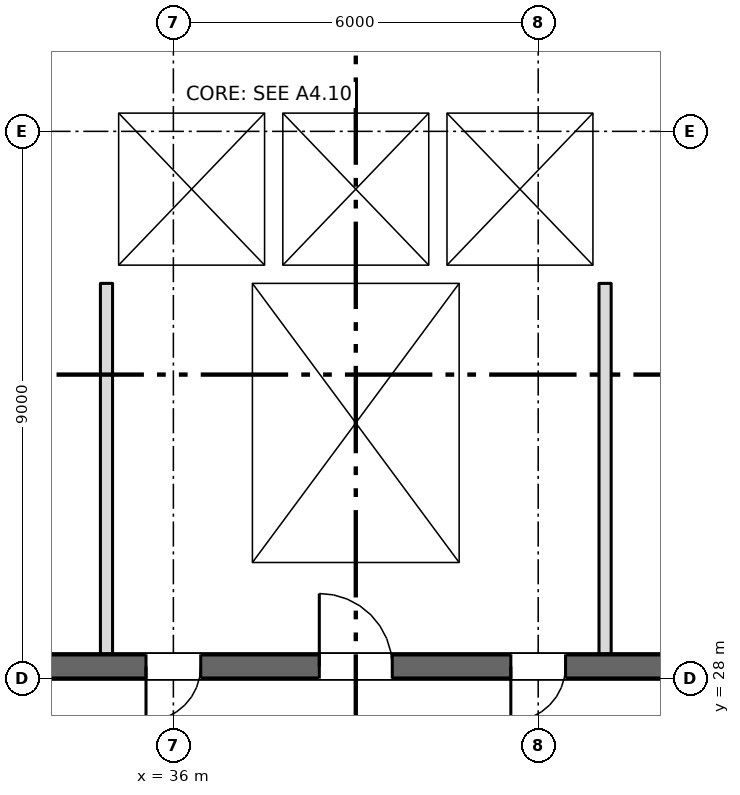
"""IFC4 building model, lengths in metres.
Left out: names, types, materials, properties, quantities, classifications, styles, units other than length and angle.
Written with IfcOpenShell. Run it as: python <this file> out.ifc"""

import sys

from ifc_helpers import new_model, si_unit, direction, frame, frame_2d, origin, place, context, subcontext, project, spatial, rectangle, extrude, element, fill, save


model = new_model("IFC4")
c1 = context("Model", 3, precision=1e-05, world=origin(), true_north=direction((0.0, 1.0)))
c2 = subcontext(c1, "Body", "Model", "MODEL_VIEW")
j1 = project(units=[si_unit("LENGTHUNIT", "METRE"), si_unit("PLANEANGLEUNIT", "RADIAN")], contexts=[c1])
p1 = place(None, origin())
s1 = spatial("IfcSite", under=j1, at=p1, CompositionType="ELEMENT")
p2 = place(p1, origin())
s2 = spatial("IfcBuilding", under=s1, at=p2, CompositionType="ELEMENT")
p3 = place(p2, frame((0.0, 0.0, 60.0)))
s3 = spatial("IfcBuildingStorey", under=s2, at=p3, CompositionType="ELEMENT", Elevation=60.0)
p4 = place(p3, frame((6.7, 28.2, 0.0), z_axis=(0.0, 0.0, 1.0), x_axis=(1.0, 0.0, 0.0)))
e1 = element("IfcWall", 1, at=p4, inside=s3, PredefinedType="SHEAR", context=c2, shape_type="SweptSolid", body=[
    extrude(rectangle(XDim=57.8, YDim=0.4, at=frame_2d((28.9, 0.0))), origin(), (0.0, 0.0, 1.0), 3.35),
])
p5 = place(p4, frame((13.85, 0.0, 0.0)))
e2 = element("IfcOpeningElement", 2, at=p5, cuts=e1, PredefinedType="OPENING", context=c2, shape_type="SweptSolid", body=[
    extrude(rectangle(XDim=0.9, YDim=2.1, at=frame_2d((0.45, 1.05))), frame((0.0, 0.21, 0.0), z_axis=(0.0, -1.0, 0.0), x_axis=(1.0, 0.0, 0.0)), (0.0, 0.0, 1.0), 0.42),
])
p6 = place(p4, frame((48.562, 0.0, 0.0)))
e3 = element("IfcOpeningElement", 3, at=p6, cuts=e1, PredefinedType="OPENING", context=c2, shape_type="SweptSolid", body=[
    extrude(rectangle(XDim=0.9, YDim=2.1, at=frame_2d((0.45, 1.05))), frame((0.0, 0.21, 0.0), z_axis=(0.0, -1.0, 0.0), x_axis=(1.0, 0.0, 0.0)), (0.0, 0.0, 1.0), 0.42),
])
p7 = place(p4, frame((51.137, 0.0, 0.0)))
e4 = element("IfcOpeningElement", 4, at=p7, cuts=e1, PredefinedType="OPENING", context=c2, shape_type="SweptSolid", body=[
    extrude(rectangle(XDim=0.9, YDim=2.1, at=frame_2d((0.45, 1.05))), frame((0.0, 0.21, 0.0), z_axis=(0.0, -1.0, 0.0), x_axis=(1.0, 0.0, 0.0)), (0.0, 0.0, 1.0), 0.42),
])
p8 = place(p4, frame((1.35, 0.0, 0.0)))
e5 = element("IfcOpeningElement", 5, at=p8, cuts=e1, PredefinedType="OPENING", context=c2, shape_type="SweptSolid", body=[
    extrude(rectangle(XDim=0.9, YDim=2.1, at=frame_2d((0.45, 1.05))), frame((0.0, 0.21, 0.0), z_axis=(0.0, -1.0, 0.0), x_axis=(1.0, 0.0, 0.0)), (0.0, 0.0, 1.0), 0.42),
])
p9 = place(p4, frame((4.7, 0.0, 0.0)))
e6 = element("IfcOpeningElement", 6, at=p9, cuts=e1, PredefinedType="OPENING", context=c2, shape_type="SweptSolid", body=[
    extrude(rectangle(XDim=1.2, YDim=2.1, at=frame_2d((0.6, 1.05))), frame((0.0, 0.21, 0.0), z_axis=(0.0, -1.0, 0.0), x_axis=(1.0, 0.0, 0.0)), (0.0, 0.0, 1.0), 0.42),
])
p10 = place(p4, frame((31.7, 0.0, 0.0)))
e7 = element("IfcOpeningElement", 7, at=p10, cuts=e1, PredefinedType="OPENING", context=c2, shape_type="SweptSolid", body=[
    extrude(rectangle(XDim=1.2, YDim=2.1, at=frame_2d((0.6, 1.05))), frame((0.0, 0.21, 0.0), z_axis=(0.0, -1.0, 0.0), x_axis=(1.0, 0.0, 0.0)), (0.0, 0.0, 1.0), 0.42),
])
p11 = place(p4, frame((55.2, 0.0, 0.0)))
e8 = element("IfcOpeningElement", 8, at=p11, cuts=e1, PredefinedType="OPENING", context=c2, shape_type="SweptSolid", body=[
    extrude(rectangle(XDim=1.2, YDim=2.1, at=frame_2d((0.6, 1.05))), frame((0.0, 0.21, 0.0), z_axis=(0.0, -1.0, 0.0), x_axis=(1.0, 0.0, 0.0)), (0.0, 0.0, 1.0), 0.42),
])
p12 = place(p4, frame((21.7, 0.0, 0.0)))
e9 = element("IfcOpeningElement", 9, at=p12, cuts=e1, PredefinedType="OPENING", context=c2, shape_type="SweptSolid", body=[
    extrude(rectangle(XDim=1.2, YDim=2.1, at=frame_2d((0.6, 1.05))), frame((0.0, 0.21, 0.0), z_axis=(0.0, -1.0, 0.0), x_axis=(1.0, 0.0, 0.0)), (0.0, 0.0, 1.0), 0.42),
])
p13 = place(p4, frame((41.7, 0.0, 0.0)))
e10 = element("IfcOpeningElement", 10, at=p13, cuts=e1, PredefinedType="OPENING", context=c2, shape_type="SweptSolid", body=[
    extrude(rectangle(XDim=1.2, YDim=2.1, at=frame_2d((0.6, 1.05))), frame((0.0, 0.21, 0.0), z_axis=(0.0, -1.0, 0.0), x_axis=(1.0, 0.0, 0.0)), (0.0, 0.0, 1.0), 0.42),
])
p14 = place(p4, frame((24.85, 0.0, 0.0)))
e11 = element("IfcOpeningElement", 11, at=p14, cuts=e1, PredefinedType="OPENING", context=c2, shape_type="SweptSolid", body=[
    extrude(rectangle(XDim=2.4, YDim=2.1, at=frame_2d((1.2, 1.05))), frame((0.0, 0.21, 0.0), z_axis=(0.0, -1.0, 0.0), x_axis=(1.0, 0.0, 0.0)), (0.0, 0.0, 1.0), 0.42),
])
p15 = place(p4, frame((37.35, 0.0, 0.0)))
e12 = element("IfcOpeningElement", 12, at=p15, cuts=e1, PredefinedType="OPENING", context=c2, shape_type="SweptSolid", body=[
    extrude(rectangle(XDim=2.4, YDim=2.1, at=frame_2d((1.2, 1.05))), frame((0.0, 0.21, 0.0), z_axis=(0.0, -1.0, 0.0), x_axis=(1.0, 0.0, 0.0)), (0.0, 0.0, 1.0), 0.42),
])
p16 = place(p4, frame((7.85, 0.0, 0.0)))
e13 = element("IfcOpeningElement", 13, at=p16, cuts=e1, PredefinedType="OPENING", context=c2, shape_type="SweptSolid", body=[
    extrude(rectangle(XDim=2.4, YDim=2.1, at=frame_2d((1.2, 1.05))), frame((0.0, 0.21, 0.0), z_axis=(0.0, -1.0, 0.0), x_axis=(1.0, 0.0, 0.0)), (0.0, 0.0, 1.0), 0.42),
])
p17 = place(p4, frame((28.85, 0.0, 0.0)))
e14 = element("IfcOpeningElement", 14, at=p17, cuts=e1, PredefinedType="OPENING", context=c2, shape_type="SweptSolid", body=[
    extrude(rectangle(XDim=0.9, YDim=2.1, at=frame_2d((0.45, 1.05))), frame((0.0, 0.21, 0.0), z_axis=(0.0, -1.0, 0.0), x_axis=(1.0, 0.0, 0.0)), (0.0, 0.0, 1.0), 0.42),
])
p18 = place(p4, frame((34.85, 0.0, 0.0)))
e15 = element("IfcOpeningElement", 15, at=p18, cuts=e1, PredefinedType="OPENING", context=c2, shape_type="SweptSolid", body=[
    extrude(rectangle(XDim=0.9, YDim=2.1, at=frame_2d((0.45, 1.05))), frame((0.0, 0.21, 0.0), z_axis=(0.0, -1.0, 0.0), x_axis=(1.0, 0.0, 0.0)), (0.0, 0.0, 1.0), 0.42),
])
for number, where, z_axis, x_axis in (
    (16, (37.15, 28.4, 0.0), (0.0, 0.0, 1.0), (0.0, 1.0, 0.0)),
    (17, (40.85, 28.4, 0.0), (0.0, 0.0, 1.0), (0.0, 1.0, 0.0)),
):
    element("IfcWall", number, at=place(p3, frame(where, z_axis=z_axis, x_axis=x_axis)), inside=s3, PredefinedType="SHEAR", context=c2, shape_type="SweptSolid", body=[
        extrude(rectangle(XDim=6.1, YDim=0.3, at=frame_2d((3.05, 0.0))), origin(), (0.0, 0.0, 1.0), 3.35),
    ])
p19 = place(p3, frame((34.8, 34.65, 0.0), z_axis=(0.0, 0.0, 1.0), x_axis=(1.0, 0.0, 0.0)))
e18 = element("IfcWall", 18, at=p19, inside=s3, PredefinedType="SHEAR", context=c2, shape_type="SweptSolid", body=[
    extrude(rectangle(XDim=8.4, YDim=0.3, at=frame_2d((4.2, 0.0))), origin(), (0.0, 0.0, 1.0), 3.35),
])
p20 = place(p3, frame((34.8, 37.45, 0.0), z_axis=(0.0, 0.0, 1.0), x_axis=(1.0, 0.0, 0.0)))
e19 = element("IfcWall", 19, at=p20, inside=s3, PredefinedType="SHEAR", context=c2, shape_type="SweptSolid", body=[
    extrude(rectangle(XDim=8.4, YDim=0.3, at=frame_2d((4.2, 0.0))), origin(), (0.0, 0.0, 1.0), 3.35),
])
p21 = place(p20, frame((0.95, 0.0, 0.0)))
e20 = element("IfcOpeningElement", 20, at=p21, cuts=e19, PredefinedType="OPENING", context=c2, shape_type="SweptSolid", body=[
    extrude(rectangle(XDim=1.1, YDim=2.1, at=frame_2d((0.55, 1.05))), frame((0.0, 0.16, 0.0), z_axis=(0.0, -1.0, 0.0), x_axis=(1.0, 0.0, 0.0)), (0.0, 0.0, 1.0), 0.32),
])
p22 = place(p20, frame((3.65, 0.0, 0.0)))
e21 = element("IfcOpeningElement", 21, at=p22, cuts=e19, PredefinedType="OPENING", context=c2, shape_type="SweptSolid", body=[
    extrude(rectangle(XDim=1.1, YDim=2.1, at=frame_2d((0.55, 1.05))), frame((0.0, 0.16, 0.0), z_axis=(0.0, -1.0, 0.0), x_axis=(1.0, 0.0, 0.0)), (0.0, 0.0, 1.0), 0.32),
])
p23 = place(p20, frame((6.35, 0.0, 0.0)))
e22 = element("IfcOpeningElement", 22, at=p23, cuts=e19, PredefinedType="OPENING", context=c2, shape_type="SweptSolid", body=[
    extrude(rectangle(XDim=1.1, YDim=2.1, at=frame_2d((0.55, 1.05))), frame((0.0, 0.16, 0.0), z_axis=(0.0, -1.0, 0.0), x_axis=(1.0, 0.0, 0.0)), (0.0, 0.0, 1.0), 0.32),
])
for number, where, z_axis, x_axis in (
    (23, (34.95, 34.8, 0.0), (0.0, 0.0, 1.0), (0.0, 1.0, 0.0)),
    (24, (43.05, 34.8, 0.0), (0.0, 0.0, 1.0), (0.0, 1.0, 0.0)),
    (25, (37.65, 34.8, 0.0), (0.0, 0.0, 1.0), (0.0, 1.0, 0.0)),
    (26, (40.35, 34.8, 0.0), (0.0, 0.0, 1.0), (0.0, 1.0, 0.0)),
):
    element("IfcWall", number, at=place(p3, frame(where, z_axis=z_axis, x_axis=x_axis)), inside=s3, PredefinedType="SHEAR", context=c2, shape_type="SweptSolid", body=[
        extrude(rectangle(XDim=2.5, YDim=0.3, at=frame_2d((1.25, 0.0))), origin(), (0.0, 0.0, 1.0), 3.35),
    ])
for number, where, z_axis, x_axis in (
    (27, (34.9, 28.4, 0.0), (0.0, 0.0, 1.0), (0.0, 1.0, 0.0)),
    (28, (43.1, 28.4, 0.0), (0.0, 0.0, 1.0), (0.0, 1.0, 0.0)),
):
    element("IfcWall", number, at=place(p3, frame(where, z_axis=z_axis, x_axis=x_axis)), inside=s3, PredefinedType="PARTITIONING", context=c2, shape_type="SweptSolid", body=[
        extrude(rectangle(XDim=6.1, YDim=0.2, at=frame_2d((3.05, 0.0))), origin(), (0.0, 0.0, 1.0), 3.35),
    ])
p24 = place(p21, origin())
e29 = element("IfcDoor", 29, at=p24, inside=s3, OperationType="SLIDING_TO_LEFT", PredefinedType="DOOR", context=c2, shape_type="SweptSolid", body=[
    extrude(rectangle(XDim=1.1, YDim=2.1, at=frame_2d((0.55, 1.05))), frame((0.0, 0.025, 0.0), z_axis=(0.0, -1.0, 0.0), x_axis=(1.0, 0.0, 0.0)), (0.0, 0.0, 1.0), 0.05),
])
fill(e20, e29)
p25 = place(p22, origin())
e30 = element("IfcDoor", 30, at=p25, inside=s3, OperationType="SLIDING_TO_LEFT", PredefinedType="DOOR", context=c2, shape_type="SweptSolid", body=[
    extrude(rectangle(XDim=1.1, YDim=2.1, at=frame_2d((0.55, 1.05))), frame((0.0, 0.025, 0.0), z_axis=(0.0, -1.0, 0.0), x_axis=(1.0, 0.0, 0.0)), (0.0, 0.0, 1.0), 0.05),
])
fill(e21, e30)
p26 = place(p23, origin())
e31 = element("IfcDoor", 31, at=p26, inside=s3, OperationType="SLIDING_TO_LEFT", PredefinedType="DOOR", context=c2, shape_type="SweptSolid", body=[
    extrude(rectangle(XDim=1.1, YDim=2.1, at=frame_2d((0.55, 1.05))), frame((0.0, 0.025, 0.0), z_axis=(0.0, -1.0, 0.0), x_axis=(1.0, 0.0, 0.0)), (0.0, 0.0, 1.0), 0.05),
])
fill(e22, e31)
p27 = place(p10, origin())
e32 = element("IfcDoor", 32, at=p27, inside=s3, OperationType="SINGLE_SWING_LEFT", PredefinedType="DOOR", context=c2, shape_type="SweptSolid", body=[
    extrude(rectangle(XDim=1.2, YDim=2.1, at=frame_2d((0.6, 1.05))), frame((0.0, 0.025, 0.0), z_axis=(0.0, -1.0, 0.0), x_axis=(1.0, 0.0, 0.0)), (0.0, 0.0, 1.0), 0.05),
])
fill(e7, e32)
p28 = place(p17, origin())
e33 = element("IfcDoor", 33, at=p28, inside=s3, OperationType="SINGLE_SWING_LEFT", PredefinedType="DOOR", context=c2, shape_type="SweptSolid", body=[
    extrude(rectangle(XDim=0.9, YDim=2.1, at=frame_2d((0.45, 1.05))), frame((0.0, 0.025, 0.0), z_axis=(0.0, -1.0, 0.0), x_axis=(1.0, 0.0, 0.0)), (0.0, 0.0, 1.0), 0.05),
])
fill(e14, e33)
p29 = place(p18, origin())
e34 = element("IfcDoor", 34, at=p29, inside=s3, OperationType="SINGLE_SWING_LEFT", PredefinedType="DOOR", context=c2, shape_type="SweptSolid", body=[
    extrude(rectangle(XDim=0.9, YDim=2.1, at=frame_2d((0.45, 1.05))), frame((0.0, 0.025, 0.0), z_axis=(0.0, -1.0, 0.0), x_axis=(1.0, 0.0, 0.0)), (0.0, 0.0, 1.0), 0.05),
])
fill(e15, e34)
save(model, sys.argv[1])
